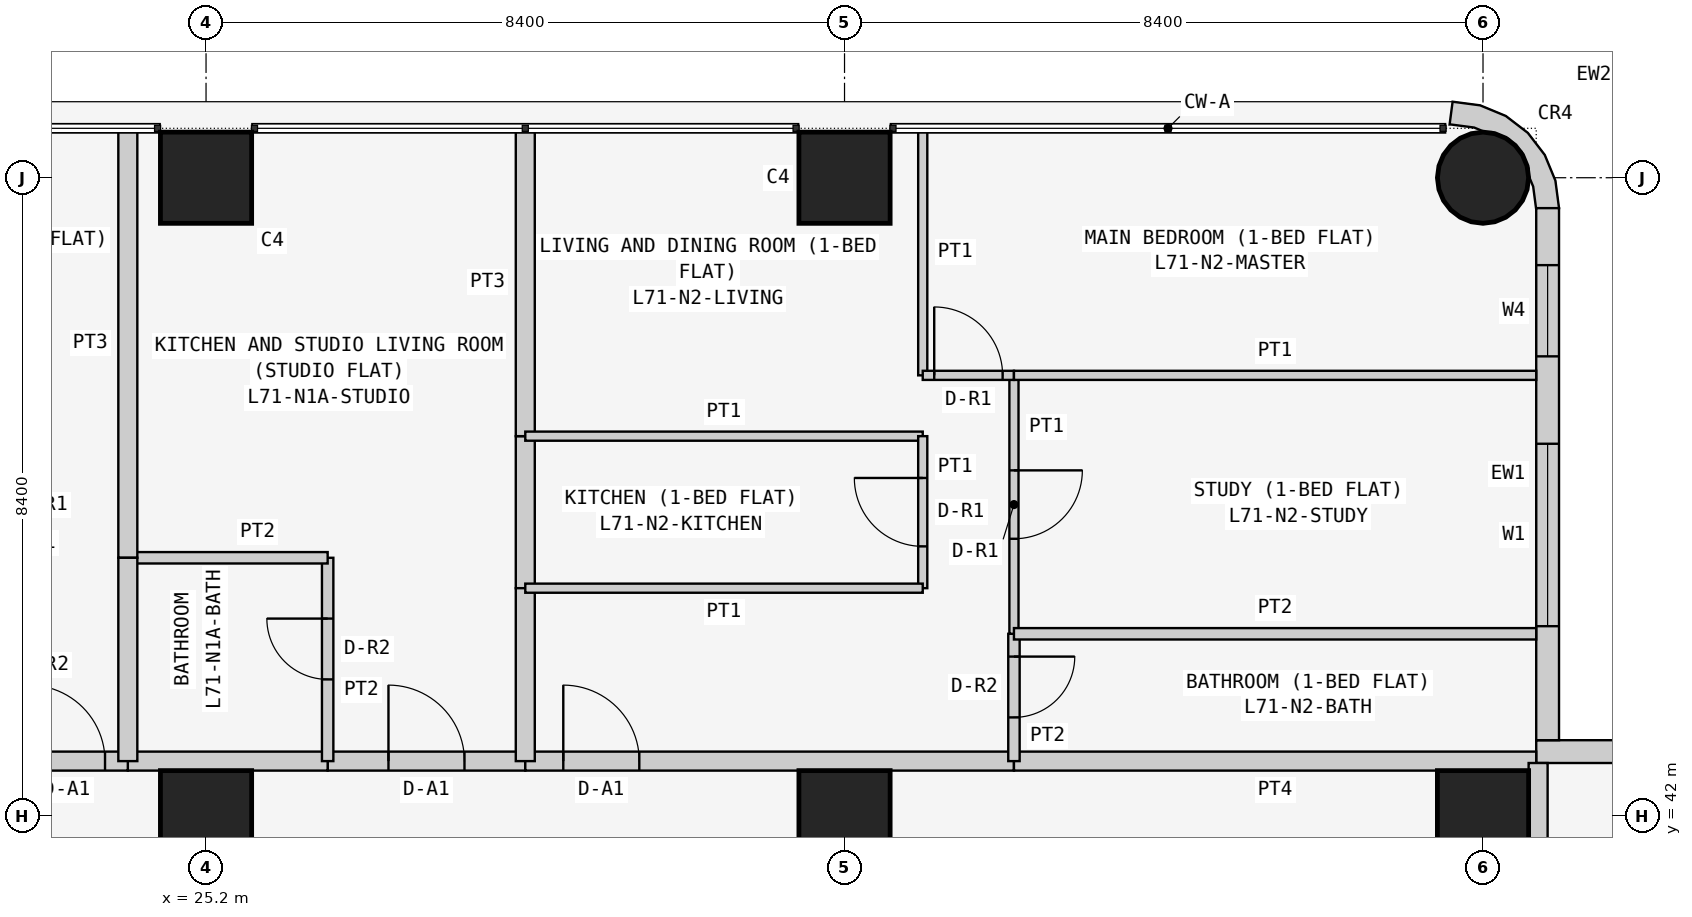
"""IFC4 building model, lengths in metres.
Left out: names, types, materials, properties, quantities, classifications, styles, units other than length and angle.
Written with IfcOpenShell. Run it as: python <this file> out.ifc"""

import sys

from ifc_helpers import new_model, si_unit, direction, frame, frame_2d, origin, origin_2d, place, context, subcontext, project, spatial, polyline, rectangle, circle, outline, extrude, element, fill, save


model = new_model("IFC4")
c1 = context("Model", 3, precision=1e-05, world=origin(), true_north=direction((0.0, 1.0)))
c2 = subcontext(c1, "Body", "Model", "MODEL_VIEW")
j1 = project(units=[si_unit("LENGTHUNIT", "METRE"), si_unit("PLANEANGLEUNIT", "RADIAN")], contexts=[c1])
p1 = place(None, origin())
s1 = spatial("IfcSite", under=j1, at=p1, CompositionType="ELEMENT")
p2 = place(p1, origin())
s2 = spatial("IfcBuilding", under=s1, at=p2, CompositionType="ELEMENT")
p3 = place(p2, frame((0.0, 0.0, 272.1)))
s3 = spatial("IfcBuildingStorey", under=s2, at=p3, CompositionType="ELEMENT", Elevation=272.1)
for number, where, z_axis, x_axis in (
    (1, (25.2, 42.0, 0.0), (0.0, 0.0, 1.0), (1.0, 0.0, 0.0)),
    (2, (25.2, 50.4, 0.0), (0.0, 0.0, 1.0), (1.0, 0.0, 0.0)),
    (3, (33.6, 42.0, 0.0), (0.0, 0.0, 1.0), (1.0, 0.0, 0.0)),
    (4, (33.6, 50.4, 0.0), (0.0, 0.0, 1.0), (1.0, 0.0, 0.0)),
    (5, (42.0, 42.0, 0.0), (0.0, 0.0, 1.0), (1.0, 0.0, 0.0)),
):
    element("IfcColumn", number, at=place(p3, frame(where, z_axis=z_axis, x_axis=x_axis)), inside=s3, PredefinedType="COLUMN", context=c2, shape_type="SweptSolid", body=[
        extrude(rectangle(XDim=1.2, YDim=1.2, at=origin_2d()), origin(), (0.0, 0.0, 1.0), 3.6),
    ])
p4 = place(p3, frame((42.0, 50.4, 0.0), z_axis=(0.0, 0.0, 1.0), x_axis=(1.0, 0.0, 0.0)))
e6 = element("IfcColumn", 6, at=p4, inside=s3, PredefinedType="COLUMN", context=c2, shape_type="SweptSolid", body=[
    extrude(circle(Radius=0.6, at=origin_2d()), origin(), (0.0, 0.0, 1.0), 3.6),
])
p5 = place(p3, frame((50.0, 42.85, 0.0), z_axis=(0.0, 0.0, 1.0), x_axis=(-1.0, 0.0, 0.0)))
e7 = element("IfcWall", 7, at=p5, inside=s3, PredefinedType="SOLIDWALL", context=c2, shape_type="SweptSolid", body=[
    extrude(rectangle(XDim=7.3, YDim=0.3, at=frame_2d((3.65, 0.0))), origin(), (0.0, 0.0, 1.0), 3.45),
])
p6 = place(p5, frame((3.1, 0.0, 0.9)))
e8 = element("IfcOpeningElement", 8, at=p6, cuts=e7, PredefinedType="OPENING", context=c2, shape_type="SweptSolid", body=[
    extrude(rectangle(XDim=2.4, YDim=1.5, at=frame_2d((1.2, 0.75))), frame((0.0, 0.16, 0.0), z_axis=(0.0, -1.0, 0.0), x_axis=(1.0, 0.0, 0.0)), (0.0, 0.0, 1.0), 0.32),
])
p7 = place(p5, frame((0.75, 0.0, 0.9)))
e9 = element("IfcOpeningElement", 9, at=p7, cuts=e7, PredefinedType="OPENING", context=c2, shape_type="SweptSolid", body=[
    extrude(rectangle(XDim=1.2, YDim=1.5, at=frame_2d((0.6, 0.75))), frame((0.0, 0.16, 0.0), z_axis=(0.0, -1.0, 0.0), x_axis=(1.0, 0.0, 0.0)), (0.0, 0.0, 1.0), 0.32),
])
p8 = place(p3, frame((42.85, 43.0, 0.0), z_axis=(0.0, 0.0, 1.0), x_axis=(0.0, 1.0, 0.0)))
e10 = element("IfcWall", 10, at=p8, inside=s3, PredefinedType="SOLIDWALL", context=c2, shape_type="SweptSolid", body=[
    extrude(rectangle(XDim=7.0, YDim=0.3, at=frame_2d((3.5, 0.0))), origin(), (0.0, 0.0, 1.0), 3.45),
])
p9 = place(p8, frame((1.5, 0.0, 0.9)))
e11 = element("IfcOpeningElement", 11, at=p9, cuts=e10, PredefinedType="OPENING", context=c2, shape_type="SweptSolid", body=[
    extrude(rectangle(XDim=2.4, YDim=1.5, at=frame_2d((1.2, 0.75))), frame((0.0, 0.16, 0.0), z_axis=(0.0, -1.0, 0.0), x_axis=(1.0, 0.0, 0.0)), (0.0, 0.0, 1.0), 0.32),
])
p10 = place(p8, frame((5.05, 0.0, 0.9)))
e12 = element("IfcOpeningElement", 12, at=p10, cuts=e10, PredefinedType="OPENING", context=c2, shape_type="SweptSolid", body=[
    extrude(rectangle(XDim=1.2, YDim=1.5, at=frame_2d((0.6, 0.75))), frame((0.0, 0.16, 0.0), z_axis=(0.0, -1.0, 0.0), x_axis=(1.0, 0.0, 0.0)), (0.0, 0.0, 1.0), 0.32),
])
p11 = place(p3, frame((42.576, 50.038, 0.0), z_axis=(0.0, 0.0, 1.0), x_axis=(0.707106781187, 0.707106781187, 0.0)))
e13 = element("IfcWall", 13, at=p11, inside=s3, PredefinedType="SOLIDWALL", context=c2, shape_type="SweptSolid", body=[
    extrude(outline(polyline([(0.233, 0.114), (0.047, -0.129), (0.033, -0.143), (0.273, -0.327), (0.495, -0.037), (0.635, 0.3), (0.683, 0.663), (0.635, 1.025), (0.495, 1.363), (0.273, 1.653), (0.033, 1.469), (0.047, 1.455), (0.233, 1.212), (0.292, 1.069), (0.358, 1.003), (0.449, 0.782), (0.449, 0.543), (0.358, 0.322), (0.292, 0.257), (0.233, 0.114)])), origin(), (0.0, 0.0, 1.0), 3.45),
])
p12 = place(p3, frame((26.8, 42.725, 0.0), z_axis=(0.0, 0.0, 1.0), x_axis=(1.0, 0.0, 0.0)))
e14 = element("IfcWall", 14, at=p12, inside=s3, PredefinedType="PARTITIONING", context=c2, shape_type="SweptSolid", body=[
    extrude(rectangle(XDim=2.6, YDim=0.25, at=frame_2d((1.3, 0.0))), origin(), (0.0, 0.0, 1.0), 3.45),
])
p13 = place(p12, frame((0.8, 0.0, 0.0)))
e15 = element("IfcOpeningElement", 15, at=p13, cuts=e14, PredefinedType="OPENING", context=c2, shape_type="SweptSolid", body=[
    extrude(rectangle(XDim=1.0, YDim=2.1, at=frame_2d((0.5, 1.05))), frame((0.0, 0.135, 0.0), z_axis=(0.0, -1.0, 0.0), x_axis=(1.0, 0.0, 0.0)), (0.0, 0.0, 1.0), 0.27),
])
p14 = place(p3, frame((24.171, 42.725, 0.0), z_axis=(0.0, 0.0, 1.0), x_axis=(1.0, 0.0, 0.0)))
e16 = element("IfcWall", 16, at=p14, inside=s3, PredefinedType="PARTITIONING", context=c2, shape_type="SweptSolid", body=[
    extrude(rectangle(XDim=2.629, YDim=0.25, at=frame_2d((1.314, 0.0))), origin(), (0.0, 0.0, 1.0), 3.45),
])
p15 = place(p3, frame((22.571, 42.725, 0.0), z_axis=(0.0, 0.0, 1.0), x_axis=(1.0, 0.0, 0.0)))
e17 = element("IfcWall", 17, at=p15, inside=s3, PredefinedType="PARTITIONING", context=c2, shape_type="SweptSolid", body=[
    extrude(rectangle(XDim=1.6, YDim=0.25, at=frame_2d((0.8, 0.0))), origin(), (0.0, 0.0, 1.0), 3.45),
])
p16 = place(p15, frame((0.3, 0.0, 0.0)))
e18 = element("IfcOpeningElement", 18, at=p16, cuts=e17, PredefinedType="OPENING", context=c2, shape_type="SweptSolid", body=[
    extrude(rectangle(XDim=1.0, YDim=2.1, at=frame_2d((0.5, 1.05))), frame((0.0, 0.135, 0.0), z_axis=(0.0, -1.0, 0.0), x_axis=(1.0, 0.0, 0.0)), (0.0, 0.0, 1.0), 0.27),
])
p17 = place(p3, frame((29.4, 42.725, 0.0), z_axis=(0.0, 0.0, 1.0), x_axis=(1.0, 0.0, 0.0)))
e19 = element("IfcWall", 19, at=p17, inside=s3, PredefinedType="PARTITIONING", context=c2, shape_type="SweptSolid", body=[
    extrude(rectangle(XDim=6.429, YDim=0.25, at=frame_2d((3.215, 0.0))), origin(), (0.0, 0.0, 1.0), 3.45),
])
p18 = place(p17, frame((0.5, 0.0, 0.0)))
e20 = element("IfcOpeningElement", 20, at=p18, cuts=e19, PredefinedType="OPENING", context=c2, shape_type="SweptSolid", body=[
    extrude(rectangle(XDim=1.0, YDim=2.1, at=frame_2d((0.5, 1.05))), frame((0.0, 0.135, 0.0), z_axis=(0.0, -1.0, 0.0), x_axis=(1.0, 0.0, 0.0)), (0.0, 0.0, 1.0), 0.27),
])
for number, where, z_axis, x_axis in (
    (21, (35.829, 42.725, 0.0), (0.0, 0.0, 1.0), (1.0, 0.0, 0.0)),
    (22, (42.725, 42.7, 0.0), (0.0, 0.0, 1.0), (0.0, -1.0, 0.0)),
):
    element("IfcWall", number, at=place(p3, frame(where, z_axis=z_axis, x_axis=x_axis)), inside=s3, PredefinedType="PARTITIONING", context=c2, shape_type="SweptSolid", body=[
        extrude(rectangle(XDim=6.871, YDim=0.25, at=frame_2d((3.436, 0.0))), origin(), (0.0, 0.0, 1.0), 3.45),
    ])
p19 = place(p3, frame((26.8, 42.725, 0.0), z_axis=(0.0, 0.0, 1.0), x_axis=(0.0, 1.0, 0.0)))
e23 = element("IfcWall", 23, at=p19, inside=s3, PredefinedType="PARTITIONING", context=c2, shape_type="SweptSolid", body=[
    extrude(rectangle(XDim=2.675, YDim=0.15, at=frame_2d((1.337, 0.0))), origin(), (0.0, 0.0, 1.0), 3.45),
])
p20 = place(p19, frame((1.075, 0.0, 0.0)))
e24 = element("IfcOpeningElement", 24, at=p20, cuts=e23, PredefinedType="OPENING", context=c2, shape_type="SweptSolid", body=[
    extrude(rectangle(XDim=0.8, YDim=2.1, at=frame_2d((0.4, 1.05))), frame((0.0, 0.085, 0.0), z_axis=(0.0, -1.0, 0.0), x_axis=(1.0, 0.0, 0.0)), (0.0, 0.0, 1.0), 0.17),
])
p21 = place(p3, frame((26.8, 45.4, 0.0), z_axis=(0.0, 0.0, 1.0), x_axis=(-1.0, 0.0, 0.0)))
e25 = element("IfcWall", 25, at=p21, inside=s3, PredefinedType="PARTITIONING", context=c2, shape_type="SweptSolid", body=[
    extrude(rectangle(XDim=2.629, YDim=0.15, at=frame_2d((1.314, 0.0))), origin(), (0.0, 0.0, 1.0), 3.45),
])
p22 = place(p3, frame((24.171, 45.4, 0.0), z_axis=(0.0, 0.0, 1.0), x_axis=(0.0, 1.0, 0.0)))
e26 = element("IfcWall", 26, at=p22, inside=s3, PredefinedType="PARTITIONING", context=c2, shape_type="SweptSolid", body=[
    extrude(rectangle(XDim=5.65, YDim=0.25, at=frame_2d((2.825, 0.0))), origin(), (0.0, 0.0, 1.0), 3.45),
])
p23 = place(p3, frame((29.4, 47.0, 0.0), z_axis=(0.0, 0.0, 1.0), x_axis=(0.0, -1.0, 0.0)))
e27 = element("IfcWall", 27, at=p23, inside=s3, PredefinedType="PARTITIONING", context=c2, shape_type="SweptSolid", body=[
    extrude(rectangle(XDim=2.0, YDim=0.25, at=frame_2d((1.0, 0.0))), origin(), (0.0, 0.0, 1.0), 2.848),
])
p24 = place(p3, frame((29.4, 45.0, 0.0), z_axis=(0.0, 0.0, 1.0), x_axis=(0.0, -1.0, 0.0)))
e28 = element("IfcWall", 28, at=p24, inside=s3, PredefinedType="PARTITIONING", context=c2, shape_type="SweptSolid", body=[
    extrude(rectangle(XDim=2.275, YDim=0.25, at=frame_2d((1.137, 0.0))), origin(), (0.0, 0.0, 1.0), 2.848),
])
p25 = place(p3, frame((29.4, 51.05, 0.0), z_axis=(0.0, 0.0, 1.0), x_axis=(0.0, -1.0, 0.0)))
e29 = element("IfcWall", 29, at=p25, inside=s3, PredefinedType="PARTITIONING", context=c2, shape_type="SweptSolid", body=[
    extrude(rectangle(XDim=4.05, YDim=0.25, at=frame_2d((2.025, 0.0))), origin(), (0.0, 0.0, 1.0), 2.848),
])
p26 = place(p3, frame((24.171, 45.4, 0.0), z_axis=(0.0, 0.0, 1.0), x_axis=(0.0, -1.0, 0.0)))
e30 = element("IfcWall", 30, at=p26, inside=s3, PredefinedType="PARTITIONING", context=c2, shape_type="SweptSolid", body=[
    extrude(rectangle(XDim=2.675, YDim=0.25, at=frame_2d((1.337, 0.0))), origin(), (0.0, 0.0, 1.0), 3.45),
])
p27 = place(p3, frame((29.4, 47.0, 0.0), z_axis=(0.0, 0.0, 1.0), x_axis=(1.0, 0.0, 0.0)))
e31 = element("IfcWall", 31, at=p27, inside=s3, PredefinedType="PARTITIONING", context=c2, shape_type="SweptSolid", body=[
    extrude(rectangle(XDim=5.229, YDim=0.12, at=frame_2d((2.615, 0.0))), origin(), (0.0, 0.0, 1.0), 3.45),
])
p28 = place(p3, frame((34.629, 47.0, 0.0), z_axis=(0.0, 0.0, 1.0), x_axis=(0.0, -1.0, 0.0)))
e32 = element("IfcWall", 32, at=p28, inside=s3, PredefinedType="PARTITIONING", context=c2, shape_type="SweptSolid", body=[
    extrude(rectangle(XDim=2.0, YDim=0.12, at=frame_2d((1.0, 0.0))), origin(), (0.0, 0.0, 1.0), 3.45),
])
p29 = place(p28, frame((0.55, 0.0, 0.0)))
e33 = element("IfcOpeningElement", 33, at=p29, cuts=e32, PredefinedType="OPENING", context=c2, shape_type="SweptSolid", body=[
    extrude(rectangle(XDim=0.9, YDim=2.1, at=frame_2d((0.45, 1.05))), frame((0.0, 0.07, 0.0), z_axis=(0.0, -1.0, 0.0), x_axis=(1.0, 0.0, 0.0)), (0.0, 0.0, 1.0), 0.14),
])
p30 = place(p3, frame((34.629, 45.0, 0.0), z_axis=(0.0, 0.0, 1.0), x_axis=(-1.0, 0.0, 0.0)))
e34 = element("IfcWall", 34, at=p30, inside=s3, PredefinedType="PARTITIONING", context=c2, shape_type="SweptSolid", body=[
    extrude(rectangle(XDim=5.229, YDim=0.12, at=frame_2d((2.615, 0.0))), origin(), (0.0, 0.0, 1.0), 3.45),
])
p31 = place(p3, frame((35.829, 44.4, 0.0), z_axis=(0.0, 0.0, 1.0), x_axis=(0.0, -1.0, 0.0)))
e35 = element("IfcWall", 35, at=p31, inside=s3, PredefinedType="PARTITIONING", context=c2, shape_type="SweptSolid", body=[
    extrude(rectangle(XDim=1.675, YDim=0.15, at=frame_2d((0.837, 0.0))), origin(), (0.0, 0.0, 1.0), 3.45),
])
p32 = place(p31, frame((0.3, 0.0, 0.0)))
e36 = element("IfcOpeningElement", 36, at=p32, cuts=e35, PredefinedType="OPENING", context=c2, shape_type="SweptSolid", body=[
    extrude(rectangle(XDim=0.8, YDim=2.1, at=frame_2d((0.4, 1.05))), frame((0.0, 0.085, 0.0), z_axis=(0.0, -1.0, 0.0), x_axis=(1.0, 0.0, 0.0)), (0.0, 0.0, 1.0), 0.17),
])
p33 = place(p3, frame((35.829, 47.8, 0.0), z_axis=(0.0, 0.0, 1.0), x_axis=(0.0, -1.0, 0.0)))
e37 = element("IfcWall", 37, at=p33, inside=s3, PredefinedType="PARTITIONING", context=c2, shape_type="SweptSolid", body=[
    extrude(rectangle(XDim=3.4, YDim=0.12, at=frame_2d((1.7, 0.0))), origin(), (0.0, 0.0, 1.0), 3.45),
])
p34 = place(p33, frame((1.25, 0.0, 0.0)))
e38 = element("IfcOpeningElement", 38, at=p34, cuts=e37, PredefinedType="OPENING", context=c2, shape_type="SweptSolid", body=[
    extrude(rectangle(XDim=0.9, YDim=2.1, at=frame_2d((0.45, 1.05))), frame((0.0, 0.07, 0.0), z_axis=(0.0, -1.0, 0.0), x_axis=(1.0, 0.0, 0.0)), (0.0, 0.0, 1.0), 0.14),
])
p35 = place(p3, frame((34.629, 51.05, 0.0), z_axis=(0.0, 0.0, 1.0), x_axis=(0.0, -1.0, 0.0)))
e39 = element("IfcWall", 39, at=p35, inside=s3, PredefinedType="PARTITIONING", context=c2, shape_type="SweptSolid", body=[
    extrude(rectangle(XDim=3.25, YDim=0.12, at=frame_2d((1.625, 0.0))), origin(), (0.0, 0.0, 1.0), 3.45),
])
p36 = place(p3, frame((34.629, 47.8, 0.0), z_axis=(0.0, 0.0, 1.0), x_axis=(1.0, 0.0, 0.0)))
e40 = element("IfcWall", 40, at=p36, inside=s3, PredefinedType="PARTITIONING", context=c2, shape_type="SweptSolid", body=[
    extrude(rectangle(XDim=1.2, YDim=0.12, at=frame_2d((0.6, 0.0))), origin(), (0.0, 0.0, 1.0), 3.45),
])
p37 = place(p36, frame((0.151, 0.0, 0.0)))
e41 = element("IfcOpeningElement", 41, at=p37, cuts=e40, PredefinedType="OPENING", context=c2, shape_type="SweptSolid", body=[
    extrude(rectangle(XDim=0.9, YDim=2.1, at=frame_2d((0.45, 1.05))), frame((0.0, 0.07, 0.0), z_axis=(0.0, -1.0, 0.0), x_axis=(1.0, 0.0, 0.0)), (0.0, 0.0, 1.0), 0.14),
])
p38 = place(p3, frame((35.829, 44.4, 0.0), z_axis=(0.0, 0.0, 1.0), x_axis=(1.0, 0.0, 0.0)))
e42 = element("IfcWall", 42, at=p38, inside=s3, PredefinedType="PARTITIONING", context=c2, shape_type="SweptSolid", body=[
    extrude(rectangle(XDim=6.871, YDim=0.15, at=frame_2d((3.436, 0.0))), origin(), (0.0, 0.0, 1.0), 3.45),
])
p39 = place(p3, frame((35.829, 47.8, 0.0), z_axis=(0.0, 0.0, 1.0), x_axis=(1.0, 0.0, 0.0)))
e43 = element("IfcWall", 43, at=p39, inside=s3, PredefinedType="PARTITIONING", context=c2, shape_type="SweptSolid", body=[
    extrude(rectangle(XDim=6.871, YDim=0.12, at=frame_2d((3.436, 0.0))), origin(), (0.0, 0.0, 1.0), 3.45),
])
p40 = place(p9, origin())
e44 = element("IfcWindow", 44, at=p40, inside=s3, PartitioningType="SINGLE_PANEL", PredefinedType="WINDOW", context=c2, shape_type="SweptSolid", body=[
    extrude(rectangle(XDim=2.4, YDim=1.5, at=frame_2d((1.2, 0.75))), frame((0.0, 0.03, 0.0), z_axis=(0.0, -1.0, 0.0), x_axis=(1.0, 0.0, 0.0)), (0.0, 0.0, 1.0), 0.06),
])
fill(e11, e44)
p41 = place(p10, origin())
e45 = element("IfcWindow", 45, at=p41, inside=s3, PartitioningType="SINGLE_PANEL", PredefinedType="WINDOW", context=c2, shape_type="SweptSolid", body=[
    extrude(rectangle(XDim=1.2, YDim=1.5, at=frame_2d((0.6, 0.75))), frame((0.0, 0.03, 0.0), z_axis=(0.0, -1.0, 0.0), x_axis=(1.0, 0.0, 0.0)), (0.0, 0.0, 1.0), 0.06),
])
fill(e12, e45)
p42 = place(p13, origin())
e46 = element("IfcDoor", 46, at=p42, inside=s3, OperationType="SINGLE_SWING_LEFT", PredefinedType="DOOR", context=c2, shape_type="SweptSolid", body=[
    extrude(rectangle(XDim=1.0, YDim=2.1, at=frame_2d((0.5, 1.05))), frame((0.0, 0.025, 0.0), z_axis=(0.0, -1.0, 0.0), x_axis=(1.0, 0.0, 0.0)), (0.0, 0.0, 1.0), 0.05),
])
fill(e15, e46)
p43 = place(p20, origin())
e47 = element("IfcDoor", 47, at=p43, inside=s3, OperationType="SINGLE_SWING_RIGHT", PredefinedType="DOOR", context=c2, shape_type="SweptSolid", body=[
    extrude(rectangle(XDim=0.8, YDim=2.1, at=frame_2d((0.4, 1.05))), frame((0.0, 0.025, 0.0), z_axis=(0.0, -1.0, 0.0), x_axis=(1.0, 0.0, 0.0)), (0.0, 0.0, 1.0), 0.05),
])
fill(e24, e47)
p44 = place(p16, origin())
e48 = element("IfcDoor", 48, at=p44, inside=s3, OperationType="SINGLE_SWING_LEFT", PredefinedType="DOOR", context=c2, shape_type="SweptSolid", body=[
    extrude(rectangle(XDim=1.0, YDim=2.1, at=frame_2d((0.5, 1.05))), frame((0.0, 0.025, 0.0), z_axis=(0.0, -1.0, 0.0), x_axis=(1.0, 0.0, 0.0)), (0.0, 0.0, 1.0), 0.05),
])
fill(e18, e48)
p45 = place(p18, origin())
e49 = element("IfcDoor", 49, at=p45, inside=s3, OperationType="SINGLE_SWING_LEFT", PredefinedType="DOOR", context=c2, shape_type="SweptSolid", body=[
    extrude(rectangle(XDim=1.0, YDim=2.1, at=frame_2d((0.5, 1.05))), frame((0.0, 0.025, 0.0), z_axis=(0.0, -1.0, 0.0), x_axis=(1.0, 0.0, 0.0)), (0.0, 0.0, 1.0), 0.05),
])
fill(e20, e49)
p46 = place(p29, frame((0.9, 0.0, 0.0), z_axis=(0.0, 0.0, 1.0), x_axis=(-1.0, 0.0, 0.0)))
e50 = element("IfcDoor", 50, at=p46, inside=s3, OperationType="SINGLE_SWING_RIGHT", PredefinedType="DOOR", context=c2, shape_type="SweptSolid", body=[
    extrude(rectangle(XDim=0.9, YDim=2.1, at=frame_2d((0.45, 1.05))), frame((0.0, 0.025, 0.0), z_axis=(0.0, -1.0, 0.0), x_axis=(1.0, 0.0, 0.0)), (0.0, 0.0, 1.0), 0.05),
])
fill(e33, e50)
p47 = place(p32, origin())
e51 = element("IfcDoor", 51, at=p47, inside=s3, OperationType="SINGLE_SWING_LEFT", PredefinedType="DOOR", context=c2, shape_type="SweptSolid", body=[
    extrude(rectangle(XDim=0.8, YDim=2.1, at=frame_2d((0.4, 1.05))), frame((0.0, 0.025, 0.0), z_axis=(0.0, -1.0, 0.0), x_axis=(1.0, 0.0, 0.0)), (0.0, 0.0, 1.0), 0.05),
])
fill(e36, e51)
p48 = place(p34, origin())
e52 = element("IfcDoor", 52, at=p48, inside=s3, OperationType="SINGLE_SWING_LEFT", PredefinedType="DOOR", context=c2, shape_type="SweptSolid", body=[
    extrude(rectangle(XDim=0.9, YDim=2.1, at=frame_2d((0.45, 1.05))), frame((0.0, 0.025, 0.0), z_axis=(0.0, -1.0, 0.0), x_axis=(1.0, 0.0, 0.0)), (0.0, 0.0, 1.0), 0.05),
])
fill(e38, e52)
p49 = place(p37, origin())
e53 = element("IfcDoor", 53, at=p49, inside=s3, OperationType="SINGLE_SWING_LEFT", PredefinedType="DOOR", context=c2, shape_type="SweptSolid", body=[
    extrude(rectangle(XDim=0.9, YDim=2.1, at=frame_2d((0.45, 1.05))), frame((0.0, 0.025, 0.0), z_axis=(0.0, -1.0, 0.0), x_axis=(1.0, 0.0, 0.0)), (0.0, 0.0, 1.0), 0.05),
])
fill(e41, e53)
save(model, sys.argv[1])
